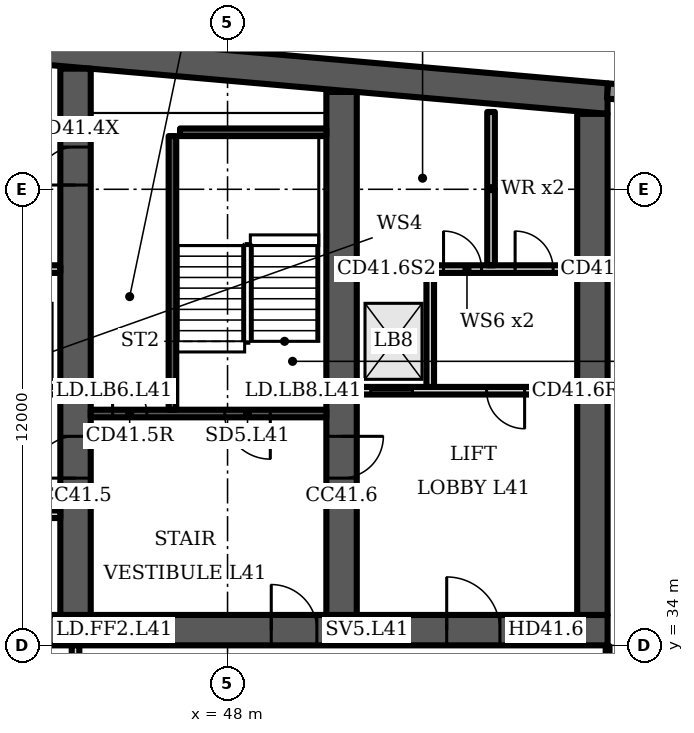
"""IFC4 building model, lengths in metres.
Left out: names, types, materials, properties, quantities, classifications, styles, units other than length and angle.
Written with IfcOpenShell. Run it as: python <this file> out.ifc"""

import sys

from ifc_helpers import new_model, si_unit, direction, frame, frame_2d, origin, place, context, subcontext, project, spatial, polyline, rectangle, outline, extrude, element, fill, save


model = new_model("IFC4")
c1 = context("Model", 3, precision=1e-05, world=origin(), true_north=direction((0.0, 1.0)))
c2 = subcontext(c1, "Body", "Model", "MODEL_VIEW")
j1 = project(units=[si_unit("LENGTHUNIT", "METRE"), si_unit("PLANEANGLEUNIT", "RADIAN")], contexts=[c1])
p1 = place(None, origin())
s1 = spatial("IfcSite", under=j1, at=p1, CompositionType="ELEMENT")
p2 = place(p1, origin())
s2 = spatial("IfcBuilding", under=s1, at=p2, CompositionType="ELEMENT")
p3 = place(p2, frame((0.0, 0.0, 169.9)))
s3 = spatial("IfcBuildingStorey", under=s2, at=p3, CompositionType="ELEMENT", Elevation=169.9)
p4 = place(p3, origin())
e1 = element("IfcWall", 1, at=p4, inside=s3, PredefinedType="SHEAR", context=c2, shape_type="SweptSolid", body=[
    extrude(outline(polyline([(16.0, 47.984), (37.0, 49.822), (58.0, 47.984), (58.0, 48.787), (37.0, 50.625), (16.0, 48.787), (16.0, 47.984)])), origin(), (0.0, 0.0, 1.0), 3.6),
])
p5 = place(p3, frame((16.0, 34.4, 0.0), z_axis=(0.0, 0.0, 1.0), x_axis=(1.0, 0.0, 0.0)))
e2 = element("IfcWall", 2, at=p5, inside=s3, PredefinedType="SHEAR", context=c2, shape_type="SweptSolid", body=[
    extrude(rectangle(XDim=42.0, YDim=0.8, at=frame_2d((21.0, 0.0))), origin(), (0.0, 0.0, 1.0), 3.6),
])
p6 = place(p5, frame((1.75, 0.0, 0.0)))
e3 = element("IfcOpeningElement", 3, at=p6, cuts=e2, PredefinedType="OPENING", context=c2, shape_type="SweptSolid", body=[
    extrude(rectangle(XDim=1.0, YDim=2.1, at=frame_2d((0.5, 1.05))), frame((0.0, 0.41, 0.0), z_axis=(0.0, -1.0, 0.0), x_axis=(1.0, 0.0, 0.0)), (0.0, 0.0, 1.0), 0.82),
])
p7 = place(p5, frame((4.65, 0.0, 0.0)))
e4 = element("IfcOpeningElement", 4, at=p7, cuts=e2, PredefinedType="OPENING", context=c2, shape_type="SweptSolid", body=[
    extrude(rectangle(XDim=1.0, YDim=2.1, at=frame_2d((0.5, 1.05))), frame((0.0, 0.41, 0.0), z_axis=(0.0, -1.0, 0.0), x_axis=(1.0, 0.0, 0.0)), (0.0, 0.0, 1.0), 0.82),
])
p8 = place(p5, frame((7.65, 0.0, 0.0)))
e5 = element("IfcOpeningElement", 5, at=p8, cuts=e2, PredefinedType="OPENING", context=c2, shape_type="SweptSolid", body=[
    extrude(rectangle(XDim=1.2, YDim=2.1, at=frame_2d((0.6, 1.05))), frame((0.0, 0.41, 0.0), z_axis=(0.0, -1.0, 0.0), x_axis=(1.0, 0.0, 0.0)), (0.0, 0.0, 1.0), 0.82),
])
p9 = place(p5, frame((14.767, 0.0, 0.0)))
e6 = element("IfcOpeningElement", 6, at=p9, cuts=e2, PredefinedType="OPENING", context=c2, shape_type="SweptSolid", body=[
    extrude(rectangle(XDim=1.1, YDim=2.1, at=frame_2d((0.55, 1.05))), frame((0.0, 0.41, 0.0), z_axis=(0.0, -1.0, 0.0), x_axis=(1.0, 0.0, 0.0)), (0.0, 0.0, 1.0), 0.82),
])
p10 = place(p5, frame((19.133, 0.0, 0.0)))
e7 = element("IfcOpeningElement", 7, at=p10, cuts=e2, PredefinedType="OPENING", context=c2, shape_type="SweptSolid", body=[
    extrude(rectangle(XDim=1.1, YDim=2.1, at=frame_2d((0.55, 1.05))), frame((0.0, 0.41, 0.0), z_axis=(0.0, -1.0, 0.0), x_axis=(1.0, 0.0, 0.0)), (0.0, 0.0, 1.0), 0.82),
])
p11 = place(p5, frame((16.8, 0.0, 0.0)))
e8 = element("IfcOpeningElement", 8, at=p11, cuts=e2, PredefinedType="OPENING", context=c2, shape_type="SweptSolid", body=[
    extrude(rectangle(XDim=1.4, YDim=2.1, at=frame_2d((0.7, 1.05))), frame((0.0, 0.41, 0.0), z_axis=(0.0, -1.0, 0.0), x_axis=(1.0, 0.0, 0.0)), (0.0, 0.0, 1.0), 0.82),
])
p12 = place(p5, frame((21.767, 0.0, 0.0)))
e9 = element("IfcOpeningElement", 9, at=p12, cuts=e2, PredefinedType="OPENING", context=c2, shape_type="SweptSolid", body=[
    extrude(rectangle(XDim=1.1, YDim=2.1, at=frame_2d((0.55, 1.05))), frame((0.0, 0.41, 0.0), z_axis=(0.0, -1.0, 0.0), x_axis=(1.0, 0.0, 0.0)), (0.0, 0.0, 1.0), 0.82),
])
p13 = place(p5, frame((23.95, 0.0, 0.0)))
e10 = element("IfcOpeningElement", 10, at=p13, cuts=e2, PredefinedType="OPENING", context=c2, shape_type="SweptSolid", body=[
    extrude(rectangle(XDim=1.1, YDim=2.1, at=frame_2d((0.55, 1.05))), frame((0.0, 0.41, 0.0), z_axis=(0.0, -1.0, 0.0), x_axis=(1.0, 0.0, 0.0)), (0.0, 0.0, 1.0), 0.82),
])
p14 = place(p5, frame((26.133, 0.0, 0.0)))
e11 = element("IfcOpeningElement", 11, at=p14, cuts=e2, PredefinedType="OPENING", context=c2, shape_type="SweptSolid", body=[
    extrude(rectangle(XDim=1.1, YDim=2.1, at=frame_2d((0.55, 1.05))), frame((0.0, 0.41, 0.0), z_axis=(0.0, -1.0, 0.0), x_axis=(1.0, 0.0, 0.0)), (0.0, 0.0, 1.0), 0.82),
])
p15 = place(p5, frame((33.15, 0.0, 0.0)))
e12 = element("IfcOpeningElement", 12, at=p15, cuts=e2, PredefinedType="OPENING", context=c2, shape_type="SweptSolid", body=[
    extrude(rectangle(XDim=1.2, YDim=2.1, at=frame_2d((0.6, 1.05))), frame((0.0, 0.41, 0.0), z_axis=(0.0, -1.0, 0.0), x_axis=(1.0, 0.0, 0.0)), (0.0, 0.0, 1.0), 0.82),
])
p16 = place(p5, frame((37.767, 0.0, 0.0)))
e13 = element("IfcOpeningElement", 13, at=p16, cuts=e2, PredefinedType="OPENING", context=c2, shape_type="SweptSolid", body=[
    extrude(rectangle(XDim=1.4, YDim=2.1, at=frame_2d((0.7, 1.05))), frame((0.0, 0.41, 0.0), z_axis=(0.0, -1.0, 0.0), x_axis=(1.0, 0.0, 0.0)), (0.0, 0.0, 1.0), 0.82),
])
p17 = place(p3, frame((44.0, 34.8, 0.0), z_axis=(0.0, 0.0, 1.0), x_axis=(0.0, 1.0, 0.0)))
e14 = element("IfcWall", 14, at=p17, inside=s3, PredefinedType="SHEAR", context=c2, shape_type="SweptSolid", body=[
    extrude(rectangle(XDim=14.374, YDim=0.8, at=frame_2d((7.187, 0.0))), origin(), (0.0, 0.0, 1.0), 3.6),
])
p18 = place(p17, frame((11.312, 0.0, 0.0)))
e15 = element("IfcOpeningElement", 15, at=p18, cuts=e14, PredefinedType="OPENING", context=c2, shape_type="SweptSolid", body=[
    extrude(rectangle(XDim=1.0, YDim=2.1, at=frame_2d((0.5, 1.05))), frame((0.0, 0.41, 0.0), z_axis=(0.0, -1.0, 0.0), x_axis=(1.0, 0.0, 0.0)), (0.0, 0.0, 1.0), 0.82),
])
p19 = place(p17, frame((3.6, 0.0, 0.0)))
e16 = element("IfcOpeningElement", 16, at=p19, cuts=e14, PredefinedType="OPENING", context=c2, shape_type="SweptSolid", body=[
    extrude(rectangle(XDim=1.1, YDim=2.1, at=frame_2d((0.55, 1.05))), frame((0.0, 0.41, 0.0), z_axis=(0.0, -1.0, 0.0), x_axis=(1.0, 0.0, 0.0)), (0.0, 0.0, 1.0), 0.82),
])
p20 = place(p3, frame((51.0, 34.8, 0.0), z_axis=(0.0, 0.0, 1.0), x_axis=(0.0, 1.0, 0.0)))
e17 = element("IfcWall", 17, at=p20, inside=s3, PredefinedType="SHEAR", context=c2, shape_type="SweptSolid", body=[
    extrude(rectangle(XDim=13.762, YDim=0.8, at=frame_2d((6.881, 0.0))), origin(), (0.0, 0.0, 1.0), 3.6),
])
p21 = place(p20, frame((3.6, 0.0, 0.0)))
e18 = element("IfcOpeningElement", 18, at=p21, cuts=e17, PredefinedType="OPENING", context=c2, shape_type="SweptSolid", body=[
    extrude(rectangle(XDim=1.1, YDim=2.1, at=frame_2d((0.55, 1.05))), frame((0.0, 0.41, 0.0), z_axis=(0.0, -1.0, 0.0), x_axis=(1.0, 0.0, 0.0)), (0.0, 0.0, 1.0), 0.82),
])
p22 = place(p3, frame((57.6, 34.8, 0.0), z_axis=(0.0, 0.0, 1.0), x_axis=(0.0, 1.0, 0.0)))
e19 = element("IfcWall", 19, at=p22, inside=s3, PredefinedType="SHEAR", context=c2, shape_type="SweptSolid", body=[
    extrude(rectangle(XDim=13.184, YDim=0.8, at=frame_2d((6.592, 0.0))), origin(), (0.0, 0.0, 1.0), 3.6),
])
p23 = place(p3, frame((60.983, 48.326, 0.0), z_axis=(0.0, 0.0, 1.0), x_axis=(-0.996194, 0.087168, 0.0)))
e20 = element("IfcWall", 20, at=p23, inside=s3, PredefinedType="SOLIDWALL", context=c2, shape_type="SweptSolid", body=[
    extrude(rectangle(XDim=2.994, YDim=0.4, at=frame_2d((1.497, 0.0))), origin(), (0.0, 0.0, 1.0), 3.2),
])
p24 = place(p3, frame((37.4, 40.7, 0.0), z_axis=(0.0, 0.0, 1.0), x_axis=(1.0, 0.0, 0.0)))
e21 = element("IfcWall", 21, at=p24, inside=s3, PredefinedType="PARTITIONING", context=c2, shape_type="SweptSolid", body=[
    extrude(rectangle(XDim=6.2, YDim=0.2, at=frame_2d((3.1, 0.0))), origin(), (0.0, 0.0, 1.0), 3.2),
])
p25 = place(p24, frame((0.367, 0.0, 0.0)))
e22 = element("IfcOpeningElement", 22, at=p25, cuts=e21, PredefinedType="OPENING", context=c2, shape_type="SweptSolid", body=[
    extrude(rectangle(XDim=1.1, YDim=2.1, at=frame_2d((0.55, 1.05))), frame((0.0, 0.11, 0.0), z_axis=(0.0, -1.0, 0.0), x_axis=(1.0, 0.0, 0.0)), (0.0, 0.0, 1.0), 0.22),
])
p26 = place(p24, frame((2.55, 0.0, 0.0)))
e23 = element("IfcOpeningElement", 23, at=p26, cuts=e21, PredefinedType="OPENING", context=c2, shape_type="SweptSolid", body=[
    extrude(rectangle(XDim=1.1, YDim=2.1, at=frame_2d((0.55, 1.05))), frame((0.0, 0.11, 0.0), z_axis=(0.0, -1.0, 0.0), x_axis=(1.0, 0.0, 0.0)), (0.0, 0.0, 1.0), 0.22),
])
p27 = place(p24, frame((4.733, 0.0, 0.0)))
e24 = element("IfcOpeningElement", 24, at=p27, cuts=e21, PredefinedType="OPENING", context=c2, shape_type="SweptSolid", body=[
    extrude(rectangle(XDim=1.1, YDim=2.1, at=frame_2d((0.55, 1.05))), frame((0.0, 0.11, 0.0), z_axis=(0.0, -1.0, 0.0), x_axis=(1.0, 0.0, 0.0)), (0.0, 0.0, 1.0), 0.22),
])
p28 = place(p3, origin())
e25 = element("IfcWall", 25, at=p28, inside=s3, PredefinedType="PARTITIONING", context=c2, shape_type="SweptSolid", body=[
    extrude(outline(polyline([(41.567, 37.1), (39.433, 37.1), (39.433, 34.8), (39.233, 34.8), (39.233, 37.65), (37.4, 37.65), (37.4, 37.85), (39.233, 37.85), (39.433, 37.85), (39.433, 37.3), (41.567, 37.3), (41.567, 37.55), (41.767, 37.55), (43.6, 37.55), (43.6, 37.35), (41.767, 37.35), (41.767, 34.8), (41.567, 34.8), (41.567, 37.1)])), origin(), (0.0, 0.0, 1.0), 3.2),
])
p29 = place(p3, origin())
e26 = element("IfcWall", 26, at=p29, inside=s3, PredefinedType="PARTITIONING", context=c2, shape_type="SweptSolid", body=[
    extrude(outline(polyline([(39.433, 40.8), (39.233, 40.8), (39.233, 43.8), (37.4, 43.8), (37.4, 44.0), (43.6, 44.0), (43.6, 43.8), (41.767, 43.8), (41.767, 40.8), (41.567, 40.8), (41.567, 43.8), (39.433, 43.8), (39.433, 40.8)])), origin(), (0.0, 0.0, 1.0), 3.2),
])
p30 = place(p3, frame((44.4, 40.1, 0.0), z_axis=(0.0, 0.0, 1.0), x_axis=(1.0, 0.0, 0.0)))
e27 = element("IfcWall", 27, at=p30, inside=s3, PredefinedType="SHEAR", context=c2, shape_type="SweptSolid", body=[
    extrude(rectangle(XDim=6.2, YDim=0.2, at=frame_2d((3.1, 0.0))), origin(), (0.0, 0.0, 1.0), 3.2),
])
p31 = place(p30, frame((3.525, 0.0, 0.0)))
e28 = element("IfcOpeningElement", 28, at=p31, cuts=e27, PredefinedType="OPENING", context=c2, shape_type="SweptSolid", body=[
    extrude(rectangle(XDim=1.2, YDim=2.1, at=frame_2d((0.6, 1.05))), frame((0.0, 0.11, 0.0), z_axis=(0.0, -1.0, 0.0), x_axis=(1.0, 0.0, 0.0)), (0.0, 0.0, 1.0), 0.22),
])
p32 = place(p30, frame((0.575, 0.0, 0.0)))
e29 = element("IfcOpeningElement", 29, at=p32, cuts=e27, PredefinedType="OPENING", context=c2, shape_type="SweptSolid", body=[
    extrude(rectangle(XDim=0.9, YDim=2.1, at=frame_2d((0.45, 1.05))), frame((0.0, 0.11, 0.0), z_axis=(0.0, -1.0, 0.0), x_axis=(1.0, 0.0, 0.0)), (0.0, 0.0, 1.0), 0.22),
])
p33 = place(p3, frame((46.55, 40.2, 0.0), z_axis=(0.0, 0.0, 1.0), x_axis=(0.0, 1.0, 0.0)))
e30 = element("IfcWall", 30, at=p33, inside=s3, PredefinedType="SHEAR", context=c2, shape_type="SweptSolid", body=[
    extrude(rectangle(XDim=7.2, YDim=0.2, at=frame_2d((3.6, 0.0))), origin(), (0.0, 0.0, 1.0), 3.2),
])
p34 = place(p3, frame((46.75, 47.5, 0.0), z_axis=(0.0, 0.0, 1.0), x_axis=(1.0, 0.0, 0.0)))
e31 = element("IfcWall", 31, at=p34, inside=s3, PredefinedType="SHEAR", context=c2, shape_type="SweptSolid", body=[
    extrude(rectangle(XDim=3.85, YDim=0.2, at=frame_2d((1.925, 0.0))), origin(), (0.0, 0.0, 1.0), 3.2),
])
p35 = place(p3, frame((51.4, 40.7, 0.0), z_axis=(0.0, 0.0, 1.0), x_axis=(1.0, 0.0, 0.0)))
e32 = element("IfcWall", 32, at=p35, inside=s3, PredefinedType="PARTITIONING", context=c2, shape_type="SweptSolid", body=[
    extrude(rectangle(XDim=5.8, YDim=0.2, at=frame_2d((2.9, 0.0))), origin(), (0.0, 0.0, 1.0), 3.2),
])
p36 = place(p35, frame((0.367, 0.0, 0.0)))
e33 = element("IfcOpeningElement", 33, at=p36, cuts=e32, PredefinedType="OPENING", context=c2, shape_type="SweptSolid", body=[
    extrude(rectangle(XDim=1.1, YDim=2.1, at=frame_2d((0.55, 1.05))), frame((0.0, 0.11, 0.0), z_axis=(0.0, -1.0, 0.0), x_axis=(1.0, 0.0, 0.0)), (0.0, 0.0, 1.0), 0.22),
])
p37 = place(p35, frame((3.417, 0.0, 0.0)))
e34 = element("IfcOpeningElement", 34, at=p37, cuts=e32, PredefinedType="OPENING", context=c2, shape_type="SweptSolid", body=[
    extrude(rectangle(XDim=1.0, YDim=2.1, at=frame_2d((0.5, 1.05))), frame((0.0, 0.11, 0.0), z_axis=(0.0, -1.0, 0.0), x_axis=(1.0, 0.0, 0.0)), (0.0, 0.0, 1.0), 0.22),
])
p38 = place(p3, frame((51.4, 43.9, 0.0), z_axis=(0.0, 0.0, 1.0), x_axis=(1.0, 0.0, 0.0)))
e35 = element("IfcWall", 35, at=p38, inside=s3, PredefinedType="PARTITIONING", context=c2, shape_type="SweptSolid", body=[
    extrude(rectangle(XDim=5.8, YDim=0.2, at=frame_2d((2.9, 0.0))), origin(), (0.0, 0.0, 1.0), 3.2),
])
p39 = place(p38, frame((2.283, 0.0, 0.0)))
e36 = element("IfcOpeningElement", 36, at=p39, cuts=e35, PredefinedType="OPENING", context=c2, shape_type="SweptSolid", body=[
    extrude(rectangle(XDim=1.0, YDim=2.1, at=frame_2d((0.5, 1.05))), frame((0.0, 0.11, 0.0), z_axis=(0.0, -1.0, 0.0), x_axis=(1.0, 0.0, 0.0)), (0.0, 0.0, 1.0), 0.22),
])
p40 = place(p38, frame((4.167, 0.0, 0.0)))
e37 = element("IfcOpeningElement", 37, at=p40, cuts=e35, PredefinedType="OPENING", context=c2, shape_type="SweptSolid", body=[
    extrude(rectangle(XDim=1.0, YDim=2.1, at=frame_2d((0.5, 1.05))), frame((0.0, 0.11, 0.0), z_axis=(0.0, -1.0, 0.0), x_axis=(1.0, 0.0, 0.0)), (0.0, 0.0, 1.0), 0.22),
])
p41 = place(p3, origin())
e38 = element("IfcWall", 38, at=p41, inside=s3, PredefinedType="PARTITIONING", context=c2, shape_type="SweptSolid", body=[
    extrude(outline(polyline([(53.433, 40.8), (53.433, 43.8), (53.233, 43.8), (53.233, 40.8), (53.433, 40.8)])), origin(), (0.0, 0.0, 1.0), 3.2),
])
p42 = place(p3, frame((54.933, 44.0, 0.0), z_axis=(0.0, 0.0, 1.0), x_axis=(0.0, 1.0, 0.0)))
e39 = element("IfcWall", 39, at=p42, inside=s3, PredefinedType="PARTITIONING", context=c2, shape_type="SweptSolid", body=[
    extrude(rectangle(XDim=4.034, YDim=0.2, at=frame_2d((2.017, 0.0))), origin(), (0.0, 0.0, 1.0), 3.2),
])
p43 = place(p3, frame((44.0, 30.5, 0.0), z_axis=(0.0, 0.0, 1.0), x_axis=(0.0, 1.0, 0.0)))
e40 = element("IfcWall", 40, at=p43, inside=s3, PredefinedType="PARTITIONING", context=c2, shape_type="SweptSolid", body=[
    extrude(rectangle(XDim=3.5, YDim=0.2, at=frame_2d((1.75, 0.0))), origin(), (0.0, 0.0, 1.0), 3.2),
])
p44 = place(p43, frame((1.2, 0.0, 0.0)))
e41 = element("IfcOpeningElement", 41, at=p44, cuts=e40, PredefinedType="OPENING", context=c2, shape_type="SweptSolid", body=[
    extrude(rectangle(XDim=1.1, YDim=2.1, at=frame_2d((0.55, 1.05))), frame((0.0, 0.11, 0.0), z_axis=(0.0, -1.0, 0.0), x_axis=(1.0, 0.0, 0.0)), (0.0, 0.0, 1.0), 0.22),
])
p45 = place(p3, frame((58.0, 31.4, 0.0), z_axis=(0.0, 0.0, 1.0), x_axis=(0.0, 1.0, 0.0)))
e42 = element("IfcWall", 42, at=p45, inside=s3, PredefinedType="PARTITIONING", context=c2, shape_type="SweptSolid", body=[
    extrude(rectangle(XDim=2.58, YDim=0.1, at=frame_2d((1.29, 0.0))), origin(), (0.0, 0.0, 1.0), 3.2),
])
p46 = place(p18, origin())
e43 = element("IfcDoor", 43, at=p46, inside=s3, OperationType="SINGLE_SWING_LEFT", PredefinedType="DOOR", context=c2, shape_type="SweptSolid", body=[
    extrude(rectangle(XDim=1.0, YDim=2.1, at=frame_2d((0.5, 1.05))), frame((0.0, 0.4, 0.0), z_axis=(0.0, -1.0, 0.0), x_axis=(1.0, 0.0, 0.0)), (0.0, 0.0, 1.0), 0.8),
])
fill(e15, e43)
p47 = place(p31, origin())
e44 = element("IfcDoor", 44, at=p47, inside=s3, OperationType="SINGLE_SWING_RIGHT", PredefinedType="DOOR", context=c2, shape_type="SweptSolid", body=[
    extrude(rectangle(XDim=1.2, YDim=2.1, at=frame_2d((0.6, 1.05))), frame((0.0, 0.025, 0.0), z_axis=(0.0, -1.0, 0.0), x_axis=(1.0, 0.0, 0.0)), (0.0, 0.0, 1.0), 0.05),
])
fill(e28, e44)
p48 = place(p32, origin())
e45 = element("IfcDoor", 45, at=p48, inside=s3, OperationType="SINGLE_SWING_LEFT", PredefinedType="DOOR", context=c2, shape_type="SweptSolid", body=[
    extrude(rectangle(XDim=0.9, YDim=2.1, at=frame_2d((0.45, 1.05))), frame((0.0, 0.025, 0.0), z_axis=(0.0, -1.0, 0.0), x_axis=(1.0, 0.0, 0.0)), (0.0, 0.0, 1.0), 0.05),
])
fill(e29, e45)
p49 = place(p15, origin())
e46 = element("IfcDoor", 46, at=p49, inside=s3, OperationType="SINGLE_SWING_LEFT", PredefinedType="DOOR", context=c2, shape_type="SweptSolid", body=[
    extrude(rectangle(XDim=1.2, YDim=2.1, at=frame_2d((0.6, 1.05))), frame((0.0, 0.025, 0.0), z_axis=(0.0, -1.0, 0.0), x_axis=(1.0, 0.0, 0.0)), (0.0, 0.0, 1.0), 0.05),
])
fill(e12, e46)
p50 = place(p16, origin())
e47 = element("IfcDoor", 47, at=p50, inside=s3, OperationType="DOUBLE_DOOR_SINGLE_SWING", PredefinedType="DOOR", context=c2, shape_type="SweptSolid", body=[
    extrude(rectangle(XDim=1.4, YDim=2.1, at=frame_2d((0.7, 1.05))), frame((0.0, 0.025, 0.0), z_axis=(0.0, -1.0, 0.0), x_axis=(1.0, 0.0, 0.0)), (0.0, 0.0, 1.0), 0.05),
])
fill(e13, e47)
p51 = place(p36, origin())
e48 = element("IfcDoor", 48, at=p51, inside=s3, OperationType="DOUBLE_DOOR_SLIDING", PredefinedType="DOOR", context=c2, shape_type="SweptSolid", body=[
    extrude(rectangle(XDim=1.1, YDim=2.1, at=frame_2d((0.55, 1.05))), frame((0.0, 0.025, 0.0), z_axis=(0.0, -1.0, 0.0), x_axis=(1.0, 0.0, 0.0)), (0.0, 0.0, 1.0), 0.05),
])
fill(e33, e48)
p52 = place(p37, origin())
e49 = element("IfcDoor", 49, at=p52, inside=s3, OperationType="SINGLE_SWING_RIGHT", PredefinedType="DOOR", context=c2, shape_type="SweptSolid", body=[
    extrude(rectangle(XDim=1.0, YDim=2.1, at=frame_2d((0.5, 1.05))), frame((0.0, 0.025, 0.0), z_axis=(0.0, -1.0, 0.0), x_axis=(1.0, 0.0, 0.0)), (0.0, 0.0, 1.0), 0.05),
])
fill(e34, e49)
p53 = place(p39, origin())
e50 = element("IfcDoor", 50, at=p53, inside=s3, OperationType="SINGLE_SWING_LEFT", PredefinedType="DOOR", context=c2, shape_type="SweptSolid", body=[
    extrude(rectangle(XDim=1.0, YDim=2.1, at=frame_2d((0.5, 1.05))), frame((0.0, 0.025, 0.0), z_axis=(0.0, -1.0, 0.0), x_axis=(1.0, 0.0, 0.0)), (0.0, 0.0, 1.0), 0.05),
])
fill(e36, e50)
p54 = place(p40, origin())
e51 = element("IfcDoor", 51, at=p54, inside=s3, OperationType="SINGLE_SWING_LEFT", PredefinedType="DOOR", context=c2, shape_type="SweptSolid", body=[
    extrude(rectangle(XDim=1.0, YDim=2.1, at=frame_2d((0.5, 1.05))), frame((0.0, 0.025, 0.0), z_axis=(0.0, -1.0, 0.0), x_axis=(1.0, 0.0, 0.0)), (0.0, 0.0, 1.0), 0.05),
])
fill(e37, e51)
p55 = place(p19, origin())
e52 = element("IfcDoor", 52, at=p55, inside=s3, OperationType="SINGLE_SWING_LEFT", PredefinedType="DOOR", context=c2, shape_type="SweptSolid", body=[
    extrude(rectangle(XDim=1.1, YDim=2.1, at=frame_2d((0.55, 1.05))), frame((0.0, 0.025, 0.0), z_axis=(0.0, -1.0, 0.0), x_axis=(1.0, 0.0, 0.0)), (0.0, 0.0, 1.0), 0.05),
])
fill(e16, e52)
p56 = place(p21, origin())
e53 = element("IfcDoor", 53, at=p56, inside=s3, OperationType="SINGLE_SWING_RIGHT", PredefinedType="DOOR", context=c2, shape_type="SweptSolid", body=[
    extrude(rectangle(XDim=1.1, YDim=2.1, at=frame_2d((0.55, 1.05))), frame((0.0, 0.025, 0.0), z_axis=(0.0, -1.0, 0.0), x_axis=(1.0, 0.0, 0.0)), (0.0, 0.0, 1.0), 0.05),
])
fill(e18, e53)
save(model, sys.argv[1])
